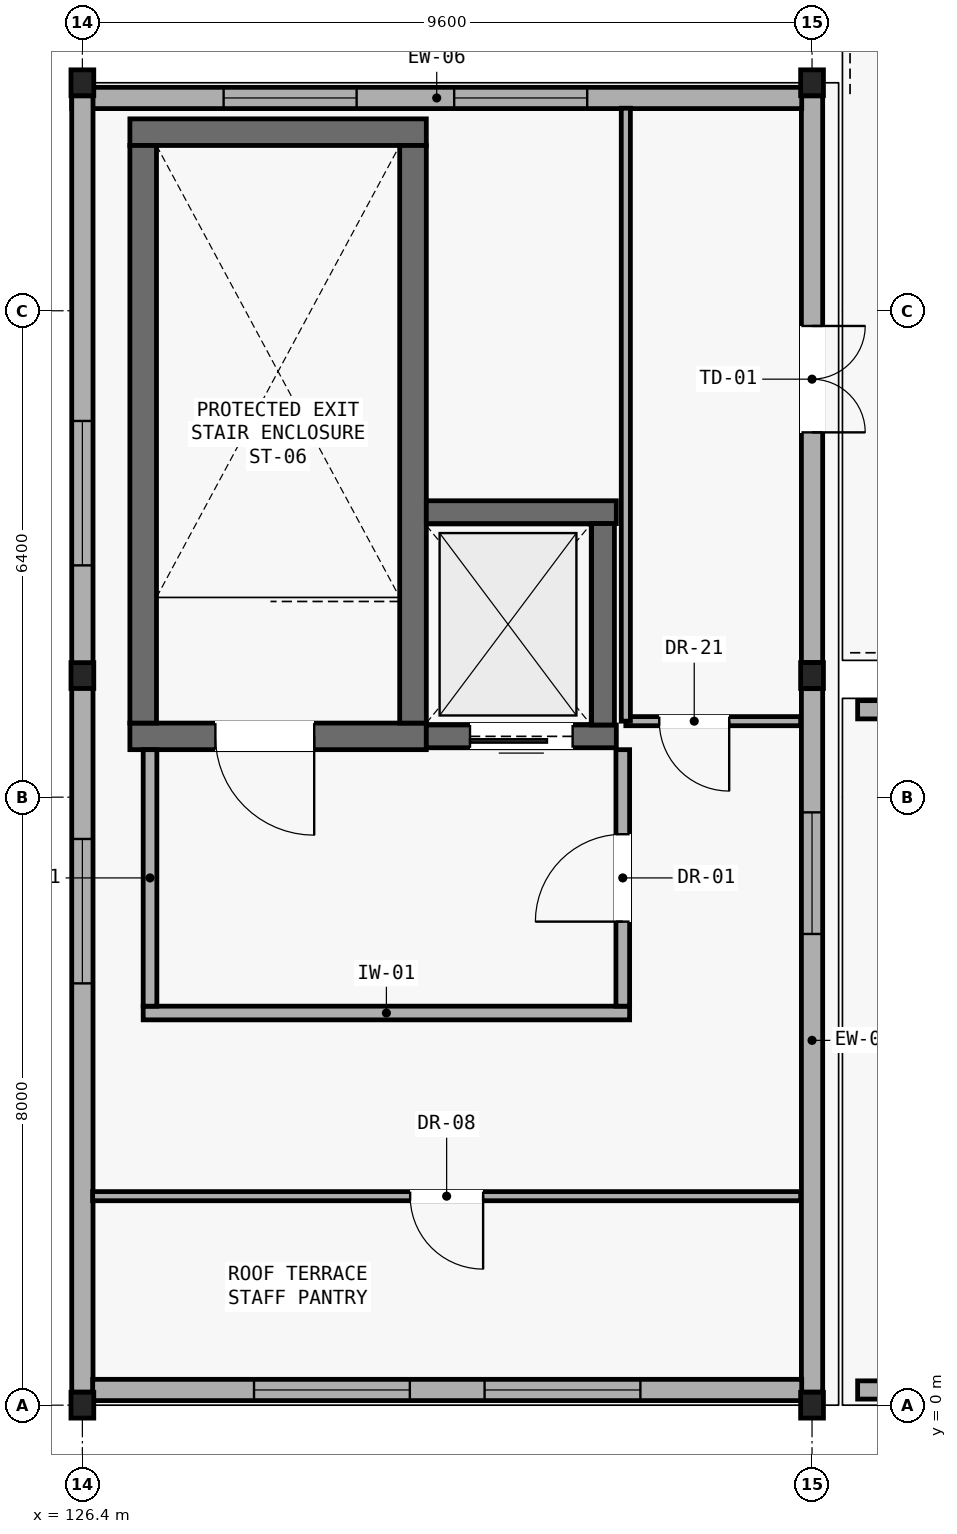
"""IFC4 building model, lengths in metres.
Left out: names, types, materials, properties, quantities, classifications, styles, units other than length and angle.
Written with IfcOpenShell. Run it as: python <this file> out.ifc"""

import sys

from ifc_helpers import new_model, si_unit, direction, frame, frame_2d, origin, origin_2d, place, context, subcontext, project, spatial, rectangle, i_section, extrude, element, fill, save


model = new_model("IFC4")
c1 = context("Model", 3, precision=1e-05, world=origin(), true_north=direction((0.0, 1.0)))
c2 = subcontext(c1, "Body", "Model", "MODEL_VIEW")
j1 = project(units=[si_unit("LENGTHUNIT", "METRE"), si_unit("PLANEANGLEUNIT", "RADIAN")], contexts=[c1])
p1 = place(None, origin())
s1 = spatial("IfcSite", under=j1, at=p1, CompositionType="ELEMENT")
p2 = place(p1, origin())
s2 = spatial("IfcBuilding", under=s1, at=p2, CompositionType="ELEMENT")
p3 = place(p2, frame((0.0, 0.0, 13.65)))
s3 = spatial("IfcBuildingStorey", under=s2, at=p3, CompositionType="ELEMENT", Elevation=13.65)
for number, where, z_axis, x_axis in (
    (1, (126.4, 0.0, 0.0), (0.0, 0.0, 1.0), (1.0, 0.0, 0.0)),
    (2, (126.4, 9.6, 0.0), (0.0, 0.0, 1.0), (1.0, 0.0, 0.0)),
    (3, (126.4, 17.4, 0.0), (0.0, 0.0, 1.0), (1.0, 0.0, 0.0)),
    (4, (136.0, 0.0, 0.0), (0.0, 0.0, 1.0), (1.0, 0.0, 0.0)),
    (5, (136.0, 9.6, 0.0), (0.0, 0.0, 1.0), (1.0, 0.0, 0.0)),
    (6, (136.0, 17.4, 0.0), (0.0, 0.0, 1.0), (1.0, 0.0, 0.0)),
):
    element("IfcColumn", number, at=place(p3, frame(where, z_axis=z_axis, x_axis=x_axis)), inside=s3, PredefinedType="COLUMN", context=c2, shape_type="SweptSolid", body=[
        extrude(i_section(OverallWidth=0.3, OverallDepth=0.34, WebThickness=0.012, FlangeThickness=0.021, FilletRadius=0.027, at=origin_2d()), origin(), (0.0, 0.0, 1.0), 4.2),
    ])
p4 = place(p3, frame((136.0, 9.772, 0.0), z_axis=(0.0, 0.0, 1.0), x_axis=(0.0, 1.0, 0.0)))
e7 = element("IfcWall", 7, at=p4, inside=s3, PredefinedType="SOLIDWALL", context=c2, shape_type="SweptSolid", body=[
    extrude(rectangle(XDim=7.456, YDim=0.28, at=frame_2d((3.728, 0.0))), origin(), (0.0, 0.0, 1.0), 3.555),
])
p5 = place(p4, frame((3.028, 0.0, 0.0)))
e8 = element("IfcOpeningElement", 8, at=p5, cuts=e7, PredefinedType="OPENING", context=c2, shape_type="SweptSolid", body=[
    extrude(rectangle(XDim=1.4, YDim=2.15, at=frame_2d((0.7, 1.075))), frame((0.0, 0.15, 0.0), z_axis=(0.0, -1.0, 0.0), x_axis=(1.0, 0.0, 0.0)), (0.0, 0.0, 1.0), 0.3),
])
p6 = place(p3, frame((136.0, 0.172, 0.0), z_axis=(0.0, 0.0, 1.0), x_axis=(0.0, 1.0, 0.0)))
e9 = element("IfcWall", 9, at=p6, inside=s3, PredefinedType="SOLIDWALL", context=c2, shape_type="SweptSolid", body=[
    extrude(rectangle(XDim=9.256, YDim=0.28, at=frame_2d((4.628, 0.0))), origin(), (0.0, 0.0, 1.0), 3.555),
])
p7 = place(p6, frame((6.028, 0.0, 0.9)))
e10 = element("IfcOpeningElement", 10, at=p7, cuts=e9, PredefinedType="OPENING", context=c2, shape_type="SweptSolid", body=[
    extrude(rectangle(XDim=1.6, YDim=1.45, at=frame_2d((0.8, 0.725))), frame((0.0, 0.15, 0.0), z_axis=(0.0, -1.0, 0.0), x_axis=(1.0, 0.0, 0.0)), (0.0, 0.0, 1.0), 0.3),
])
p8 = place(p3, frame((126.26, 17.2, 0.0), z_axis=(0.0, 0.0, 1.0), x_axis=(1.0, 0.0, 0.0)))
e11 = element("IfcWall", 11, at=p8, inside=s3, PredefinedType="SOLIDWALL", context=c2, shape_type="SweptSolid", body=[
    extrude(rectangle(XDim=9.604, YDim=0.28, at=frame_2d((4.802, 0.0))), origin(), (0.0, 0.0, 1.0), 3.635),
])
p9 = place(p8, frame((1.998, 0.0, 0.9)))
e12 = element("IfcOpeningElement", 12, at=p9, cuts=e11, PredefinedType="OPENING", context=c2, shape_type="SweptSolid", body=[
    extrude(rectangle(XDim=1.75, YDim=1.45, at=frame_2d((0.875, 0.725))), frame((0.0, 0.15, 0.0), z_axis=(0.0, -1.0, 0.0), x_axis=(1.0, 0.0, 0.0)), (0.0, 0.0, 1.0), 0.3),
])
p10 = place(p8, frame((5.032, 0.0, 0.9)))
e13 = element("IfcOpeningElement", 13, at=p10, cuts=e11, PredefinedType="OPENING", context=c2, shape_type="SweptSolid", body=[
    extrude(rectangle(XDim=1.75, YDim=1.45, at=frame_2d((0.875, 0.725))), frame((0.0, 0.15, 0.0), z_axis=(0.0, -1.0, 0.0), x_axis=(1.0, 0.0, 0.0)), (0.0, 0.0, 1.0), 0.3),
])
p11 = place(p3, frame((126.4, 0.172, 0.0), z_axis=(0.0, 0.0, 1.0), x_axis=(0.0, 1.0, 0.0)))
e14 = element("IfcWall", 14, at=p11, inside=s3, PredefinedType="SOLIDWALL", context=c2, shape_type="SweptSolid", body=[
    extrude(rectangle(XDim=17.056, YDim=0.28, at=frame_2d((8.528, 0.0))), origin(), (0.0, 0.0, 1.0), 3.555),
])
p12 = place(p11, frame((5.378, 0.0, 0.9)))
e15 = element("IfcOpeningElement", 15, at=p12, cuts=e14, PredefinedType="OPENING", context=c2, shape_type="SweptSolid", body=[
    extrude(rectangle(XDim=1.9, YDim=1.45, at=frame_2d((0.95, 0.725))), frame((0.0, 0.15, 0.0), z_axis=(0.0, -1.0, 0.0), x_axis=(1.0, 0.0, 0.0)), (0.0, 0.0, 1.0), 0.3),
])
p13 = place(p11, frame((10.878, 0.0, 0.9)))
e16 = element("IfcOpeningElement", 16, at=p13, cuts=e14, PredefinedType="OPENING", context=c2, shape_type="SweptSolid", body=[
    extrude(rectangle(XDim=1.9, YDim=1.45, at=frame_2d((0.95, 0.725))), frame((0.0, 0.15, 0.0), z_axis=(0.0, -1.0, 0.0), x_axis=(1.0, 0.0, 0.0)), (0.0, 0.0, 1.0), 0.3),
])
p14 = place(p3, frame((126.536, 0.2, 0.0), z_axis=(0.0, 0.0, 1.0), x_axis=(1.0, 0.0, 0.0)))
e17 = element("IfcWall", 17, at=p14, inside=s3, PredefinedType="SOLIDWALL", context=c2, shape_type="SweptSolid", body=[
    extrude(rectangle(XDim=9.328, YDim=0.28, at=frame_2d((4.664, 0.0))), origin(), (0.0, 0.0, 1.0), 3.635),
])
p15 = place(p14, frame((2.122, 0.0, 0.9)))
e18 = element("IfcOpeningElement", 18, at=p15, cuts=e17, PredefinedType="OPENING", context=c2, shape_type="SweptSolid", body=[
    extrude(rectangle(XDim=2.05, YDim=1.45, at=frame_2d((1.025, 0.725))), frame((0.0, 0.15, 0.0), z_axis=(0.0, -1.0, 0.0), x_axis=(1.0, 0.0, 0.0)), (0.0, 0.0, 1.0), 0.3),
])
p16 = place(p14, frame((5.156, 0.0, 0.9)))
e19 = element("IfcOpeningElement", 19, at=p16, cuts=e17, PredefinedType="OPENING", context=c2, shape_type="SweptSolid", body=[
    extrude(rectangle(XDim=2.05, YDim=1.45, at=frame_2d((1.025, 0.725))), frame((0.0, 0.15, 0.0), z_axis=(0.0, -1.0, 0.0), x_axis=(1.0, 0.0, 0.0)), (0.0, 0.0, 1.0), 0.3),
])
for number, where, z_axis, x_axis in (
    (20, (136.6, 0.2, 0.0), (0.0, 0.0, 1.0), (1.0, 0.0, 0.0)),
    (21, (171.0, 9.15, 0.0), (0.0, 0.0, 1.0), (-1.0, 0.0, 0.0)),
):
    element("IfcWall", number, at=place(p3, frame(where, z_axis=z_axis, x_axis=x_axis)), inside=s3, PredefinedType="PARAPET", context=c2, shape_type="SweptSolid", body=[
        extrude(rectangle(XDim=34.4, YDim=0.24, at=frame_2d((17.2, 0.0))), origin(), (0.0, 0.0, 1.0), 1.1),
    ])
p17 = place(p3, frame((127.025, 8.8, 0.0), z_axis=(0.0, 0.0, 1.0), x_axis=(1.0, 0.0, 0.0)))
e22 = element("IfcWall", 22, at=p17, inside=s3, PredefinedType="SHEAR", context=c2, shape_type="SweptSolid", body=[
    extrude(rectangle(XDim=3.9, YDim=0.35, at=frame_2d((1.95, 0.0))), origin(), (0.0, 0.0, 1.0), 3.98),
])
p18 = place(p17, frame((1.125, 0.0, 0.0)))
e23 = element("IfcOpeningElement", 23, at=p18, cuts=e22, PredefinedType="OPENING", context=c2, shape_type="SweptSolid", body=[
    extrude(rectangle(XDim=1.3, YDim=2.15, at=frame_2d((0.65, 1.075))), frame((0.0, 0.185, 0.0), z_axis=(0.0, -1.0, 0.0), x_axis=(1.0, 0.0, 0.0)), (0.0, 0.0, 1.0), 0.37),
])
p19 = place(p3, frame((127.025, 16.75, 0.0), z_axis=(0.0, 0.0, 1.0), x_axis=(1.0, 0.0, 0.0)))
e24 = element("IfcWall", 24, at=p19, inside=s3, PredefinedType="SHEAR", context=c2, shape_type="SweptSolid", body=[
    extrude(rectangle(XDim=3.9, YDim=0.35, at=frame_2d((1.95, 0.0))), origin(), (0.0, 0.0, 1.0), 3.98),
])
for number, where, z_axis, x_axis in (
    (25, (127.2, 8.975, 0.0), (0.0, 0.0, 1.0), (0.0, 1.0, 0.0)),
    (26, (130.75, 8.975, 0.0), (0.0, 0.0, 1.0), (0.0, 1.0, 0.0)),
):
    element("IfcWall", number, at=place(p3, frame(where, z_axis=z_axis, x_axis=x_axis)), inside=s3, PredefinedType="SHEAR", context=c2, shape_type="SweptSolid", body=[
        extrude(rectangle(XDim=7.6, YDim=0.35, at=frame_2d((3.8, 0.0))), origin(), (0.0, 0.0, 1.0), 3.98),
    ])
p20 = place(p3, frame((130.925, 8.8, 0.0), z_axis=(0.0, 0.0, 1.0), x_axis=(1.0, 0.0, 0.0)))
e27 = element("IfcWall", 27, at=p20, inside=s3, PredefinedType="SHEAR", context=c2, shape_type="SweptSolid", body=[
    extrude(rectangle(XDim=2.5, YDim=0.3, at=frame_2d((1.25, 0.0))), origin(), (0.0, 0.0, 1.0), 3.98),
])
p21 = place(p20, frame((0.575, 0.0, 0.0)))
e28 = element("IfcOpeningElement", 28, at=p21, cuts=e27, PredefinedType="OPENING", context=c2, shape_type="SweptSolid", body=[
    extrude(rectangle(XDim=1.35, YDim=2.15, at=frame_2d((0.675, 1.075))), frame((0.0, 0.16, 0.0), z_axis=(0.0, -1.0, 0.0), x_axis=(1.0, 0.0, 0.0)), (0.0, 0.0, 1.0), 0.32),
])
p22 = place(p3, frame((130.925, 11.75, 0.0), z_axis=(0.0, 0.0, 1.0), x_axis=(1.0, 0.0, 0.0)))
e29 = element("IfcWall", 29, at=p22, inside=s3, PredefinedType="SHEAR", context=c2, shape_type="SweptSolid", body=[
    extrude(rectangle(XDim=2.5, YDim=0.3, at=frame_2d((1.25, 0.0))), origin(), (0.0, 0.0, 1.0), 3.98),
])
p23 = place(p3, frame((133.25, 8.95, 0.0), z_axis=(0.0, 0.0, 1.0), x_axis=(0.0, 1.0, 0.0)))
e30 = element("IfcWall", 30, at=p23, inside=s3, PredefinedType="SHEAR", context=c2, shape_type="SweptSolid", body=[
    extrude(rectangle(XDim=2.65, YDim=0.3, at=frame_2d((1.325, 0.0))), origin(), (0.0, 0.0, 1.0), 3.98),
])
p24 = place(p3, frame((127.2, 5.16, 0.0), z_axis=(0.0, 0.0, 1.0), x_axis=(1.0, 0.0, 0.0)))
e31 = element("IfcWall", 31, at=p24, inside=s3, PredefinedType="PARTITIONING", context=c2, shape_type="SweptSolid", body=[
    extrude(rectangle(XDim=6.4, YDim=0.18, at=frame_2d((3.2, 0.0))), origin(), (0.0, 0.0, 1.0), 3.98),
])
p25 = place(p3, frame((127.29, 5.25, 0.0), z_axis=(0.0, 0.0, 1.0), x_axis=(0.0, 1.0, 0.0)))
e32 = element("IfcWall", 32, at=p25, inside=s3, PredefinedType="PARTITIONING", context=c2, shape_type="SweptSolid", body=[
    extrude(rectangle(XDim=3.375, YDim=0.18, at=frame_2d((1.688, 0.0))), origin(), (0.0, 0.0, 1.0), 3.98),
])
p26 = place(p3, frame((133.51, 5.25, 0.0), z_axis=(0.0, 0.0, 1.0), x_axis=(0.0, 1.0, 0.0)))
e33 = element("IfcWall", 33, at=p26, inside=s3, PredefinedType="PARTITIONING", context=c2, shape_type="SweptSolid", body=[
    extrude(rectangle(XDim=3.375, YDim=0.18, at=frame_2d((1.688, 0.0))), origin(), (0.0, 0.0, 1.0), 3.98),
])
p27 = place(p26, frame((1.113, 0.0, 0.0)))
e34 = element("IfcOpeningElement", 34, at=p27, cuts=e33, PredefinedType="OPENING", context=c2, shape_type="SweptSolid", body=[
    extrude(rectangle(XDim=1.15, YDim=2.15, at=frame_2d((0.575, 1.075))), frame((0.0, 0.1, 0.0), z_axis=(0.0, -1.0, 0.0), x_axis=(1.0, 0.0, 0.0)), (0.0, 0.0, 1.0), 0.2),
])
p28 = place(p3, frame((133.55, 9.0, 0.0), z_axis=(0.0, 0.0, 1.0), x_axis=(1.0, 0.0, 0.0)))
e35 = element("IfcWall", 35, at=p28, inside=s3, PredefinedType="PARTITIONING", context=c2, shape_type="SweptSolid", body=[
    extrude(rectangle(XDim=2.3, YDim=0.12, at=frame_2d((1.15, 0.0))), origin(), (0.0, 0.0, 1.0), 3.98),
])
p29 = place(p28, frame((0.44, 0.0, 0.0)))
e36 = element("IfcOpeningElement", 36, at=p29, cuts=e35, PredefinedType="OPENING", context=c2, shape_type="SweptSolid", body=[
    extrude(rectangle(XDim=0.92, YDim=2.08, at=frame_2d((0.46, 1.04))), frame((0.0, 0.07, 0.0), z_axis=(0.0, -1.0, 0.0), x_axis=(1.0, 0.0, 0.0)), (0.0, 0.0, 1.0), 0.14),
])
p30 = place(p3, frame((133.55, 17.065, 0.0), z_axis=(0.0, 0.0, 1.0), x_axis=(0.0, -1.0, 0.0)))
e37 = element("IfcWall", 37, at=p30, inside=s3, PredefinedType="PARTITIONING", context=c2, shape_type="SweptSolid", body=[
    extrude(rectangle(XDim=8.065, YDim=0.12, at=frame_2d((4.032, 0.0))), origin(), (0.0, 0.0, 1.0), 3.98),
])
p31 = place(p3, frame((135.85, 2.75, 0.0), z_axis=(0.0, 0.0, 1.0), x_axis=(-1.0, 0.0, 0.0)))
e38 = element("IfcWall", 38, at=p31, inside=s3, PredefinedType="PARTITIONING", context=c2, shape_type="SweptSolid", body=[
    extrude(rectangle(XDim=9.315, YDim=0.12, at=frame_2d((4.658, 0.0))), origin(), (0.0, 0.0, 1.0), 3.98),
])
p32 = place(p31, frame((4.177, 0.0, 0.0)))
e39 = element("IfcOpeningElement", 39, at=p32, cuts=e38, PredefinedType="OPENING", context=c2, shape_type="SweptSolid", body=[
    extrude(rectangle(XDim=0.96, YDim=2.08, at=frame_2d((0.48, 1.04))), frame((0.0, 0.07, 0.0), z_axis=(0.0, -1.0, 0.0), x_axis=(1.0, 0.0, 0.0)), (0.0, 0.0, 1.0), 0.14),
])
p33 = place(p5, frame((1.4, 0.0, 0.0), z_axis=(0.0, 0.0, 1.0), x_axis=(-1.0, 0.0, 0.0)))
e40 = element("IfcDoor", 40, at=p33, inside=s3, OperationType="SINGLE_SWING_LEFT", PredefinedType="DOOR", context=c2, shape_type="SweptSolid", body=[
    extrude(rectangle(XDim=1.4, YDim=2.15, at=frame_2d((0.7, 1.075))), frame((0.0, 0.025, 0.0), z_axis=(0.0, -1.0, 0.0), x_axis=(1.0, 0.0, 0.0)), (0.0, 0.0, 1.0), 0.05),
])
fill(e8, e40)
p34 = place(p7, origin())
e41 = element("IfcWindow", 41, at=p34, inside=s3, PartitioningType="SINGLE_PANEL", PredefinedType="WINDOW", context=c2, shape_type="SweptSolid", body=[
    extrude(rectangle(XDim=1.6, YDim=1.45, at=frame_2d((0.8, 0.725))), frame((0.0, 0.03, 0.0), z_axis=(0.0, -1.0, 0.0), x_axis=(1.0, 0.0, 0.0)), (0.0, 0.0, 1.0), 0.06),
])
fill(e10, e41)
p35 = place(p9, origin())
e42 = element("IfcWindow", 42, at=p35, inside=s3, PartitioningType="SINGLE_PANEL", PredefinedType="WINDOW", context=c2, shape_type="SweptSolid", body=[
    extrude(rectangle(XDim=1.75, YDim=1.45, at=frame_2d((0.875, 0.725))), frame((0.0, 0.03, 0.0), z_axis=(0.0, -1.0, 0.0), x_axis=(1.0, 0.0, 0.0)), (0.0, 0.0, 1.0), 0.06),
])
fill(e12, e42)
p36 = place(p10, origin())
e43 = element("IfcWindow", 43, at=p36, inside=s3, PartitioningType="SINGLE_PANEL", PredefinedType="WINDOW", context=c2, shape_type="SweptSolid", body=[
    extrude(rectangle(XDim=1.75, YDim=1.45, at=frame_2d((0.875, 0.725))), frame((0.0, 0.03, 0.0), z_axis=(0.0, -1.0, 0.0), x_axis=(1.0, 0.0, 0.0)), (0.0, 0.0, 1.0), 0.06),
])
fill(e13, e43)
p37 = place(p12, origin())
e44 = element("IfcWindow", 44, at=p37, inside=s3, PartitioningType="SINGLE_PANEL", PredefinedType="WINDOW", context=c2, shape_type="SweptSolid", body=[
    extrude(rectangle(XDim=1.9, YDim=1.45, at=frame_2d((0.95, 0.725))), frame((0.0, 0.03, 0.0), z_axis=(0.0, -1.0, 0.0), x_axis=(1.0, 0.0, 0.0)), (0.0, 0.0, 1.0), 0.06),
])
fill(e15, e44)
p38 = place(p13, origin())
e45 = element("IfcWindow", 45, at=p38, inside=s3, PartitioningType="SINGLE_PANEL", PredefinedType="WINDOW", context=c2, shape_type="SweptSolid", body=[
    extrude(rectangle(XDim=1.9, YDim=1.45, at=frame_2d((0.95, 0.725))), frame((0.0, 0.03, 0.0), z_axis=(0.0, -1.0, 0.0), x_axis=(1.0, 0.0, 0.0)), (0.0, 0.0, 1.0), 0.06),
])
fill(e16, e45)
p39 = place(p15, origin())
e46 = element("IfcWindow", 46, at=p39, inside=s3, PartitioningType="SINGLE_PANEL", PredefinedType="WINDOW", context=c2, shape_type="SweptSolid", body=[
    extrude(rectangle(XDim=2.05, YDim=1.45, at=frame_2d((1.025, 0.725))), frame((0.0, 0.03, 0.0), z_axis=(0.0, -1.0, 0.0), x_axis=(1.0, 0.0, 0.0)), (0.0, 0.0, 1.0), 0.06),
])
fill(e18, e46)
p40 = place(p16, origin())
e47 = element("IfcWindow", 47, at=p40, inside=s3, PartitioningType="SINGLE_PANEL", PredefinedType="WINDOW", context=c2, shape_type="SweptSolid", body=[
    extrude(rectangle(XDim=2.05, YDim=1.45, at=frame_2d((1.025, 0.725))), frame((0.0, 0.03, 0.0), z_axis=(0.0, -1.0, 0.0), x_axis=(1.0, 0.0, 0.0)), (0.0, 0.0, 1.0), 0.06),
])
fill(e19, e47)
p41 = place(p18, frame((1.3, 0.0, 0.0), z_axis=(0.0, 0.0, 1.0), x_axis=(-1.0, 0.0, 0.0)))
e48 = element("IfcDoor", 48, at=p41, inside=s3, OperationType="SINGLE_SWING_RIGHT", PredefinedType="DOOR", context=c2, shape_type="SweptSolid", body=[
    extrude(rectangle(XDim=1.3, YDim=2.15, at=frame_2d((0.65, 1.075))), frame((0.0, 0.025, 0.0), z_axis=(0.0, -1.0, 0.0), x_axis=(1.0, 0.0, 0.0)), (0.0, 0.0, 1.0), 0.05),
])
fill(e23, e48)
p42 = place(p21, frame((1.35, 0.0, 0.0), z_axis=(0.0, 0.0, 1.0), x_axis=(-1.0, 0.0, 0.0)))
e49 = element("IfcDoor", 49, at=p42, inside=s3, OperationType="SLIDING_TO_RIGHT", PredefinedType="DOOR", context=c2, shape_type="SweptSolid", body=[
    extrude(rectangle(XDim=1.35, YDim=2.15, at=frame_2d((0.675, 1.075))), frame((0.0, 0.025, 0.0), z_axis=(0.0, -1.0, 0.0), x_axis=(1.0, 0.0, 0.0)), (0.0, 0.0, 1.0), 0.05),
])
fill(e28, e49)
p43 = place(p27, origin())
e50 = element("IfcDoor", 50, at=p43, inside=s3, OperationType="SINGLE_SWING_LEFT", PredefinedType="DOOR", context=c2, shape_type="SweptSolid", body=[
    extrude(rectangle(XDim=1.15, YDim=2.15, at=frame_2d((0.575, 1.075))), frame((0.0, 0.025, 0.0), z_axis=(0.0, -1.0, 0.0), x_axis=(1.0, 0.0, 0.0)), (0.0, 0.0, 1.0), 0.05),
])
fill(e34, e50)
p44 = place(p29, frame((0.92, 0.0, 0.0), z_axis=(0.0, 0.0, 1.0), x_axis=(-1.0, 0.0, 0.0)))
e51 = element("IfcDoor", 51, at=p44, inside=s3, OperationType="SINGLE_SWING_RIGHT", PredefinedType="DOOR", context=c2, shape_type="SweptSolid", body=[
    extrude(rectangle(XDim=0.92, YDim=2.08, at=frame_2d((0.46, 1.04))), frame((0.0, 0.025, 0.0), z_axis=(0.0, -1.0, 0.0), x_axis=(1.0, 0.0, 0.0)), (0.0, 0.0, 1.0), 0.05),
])
fill(e36, e51)
p45 = place(p32, origin())
e52 = element("IfcDoor", 52, at=p45, inside=s3, OperationType="SINGLE_SWING_LEFT", PredefinedType="DOOR", context=c2, shape_type="SweptSolid", body=[
    extrude(rectangle(XDim=0.96, YDim=2.08, at=frame_2d((0.48, 1.04))), frame((0.0, 0.025, 0.0), z_axis=(0.0, -1.0, 0.0), x_axis=(1.0, 0.0, 0.0)), (0.0, 0.0, 1.0), 0.05),
])
fill(e39, e52)
save(model, sys.argv[1])
